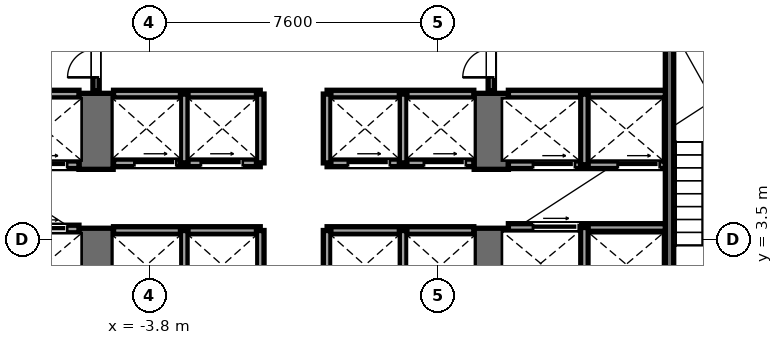
"""IFC4 building model, lengths in metres.
Left out: names, types, materials, properties, quantities, classifications, styles, units other than length and angle.
Written with IfcOpenShell. Run it as: python <this file> out.ifc"""

import sys

from ifc_helpers import new_model, si_unit, direction, frame, frame_2d, origin, place, context, subcontext, project, spatial, rectangle, extrude, element, fill, save


model = new_model("IFC4")
c1 = context("Model", 3, precision=1e-05, world=origin(), true_north=direction((0.0, 1.0)))
c2 = subcontext(c1, "Body", "Model", "MODEL_VIEW")
j1 = project(units=[si_unit("LENGTHUNIT", "METRE"), si_unit("PLANEANGLEUNIT", "RADIAN")], contexts=[c1])
p1 = place(None, origin())
s1 = spatial("IfcSite", under=j1, at=p1, CompositionType="ELEMENT")
p2 = place(p1, origin())
s2 = spatial("IfcBuilding", under=s1, at=p2, CompositionType="ELEMENT")
p3 = place(p2, origin())
s3 = spatial("IfcBuildingStorey", under=s2, at=p3, CompositionType="ELEMENT", Elevation=0.0)
p4 = place(p3, frame((-5.2, 0.95, 0.0), z_axis=(0.0, 0.0, 1.0), x_axis=(0.0, 1.0, 0.0)))
e1 = element("IfcWall", 1, at=p4, inside=s3, PredefinedType="SHEAR", context=c2, shape_type="SweptSolid", body=[
    extrude(rectangle(XDim=2.85, YDim=0.9, at=frame_2d((1.425, 0.0))), origin(), (0.0, 0.0, 1.0), 6.0),
])
p5 = place(p3, frame((-5.2, 5.35, 0.0), z_axis=(0.0, 0.0, 1.0), x_axis=(0.0, 1.0, 0.0)))
e2 = element("IfcWall", 2, at=p5, inside=s3, PredefinedType="SHEAR", context=c2, shape_type="SweptSolid", body=[
    extrude(rectangle(XDim=2.0, YDim=0.9, at=frame_2d((1.0, 0.0))), origin(), (0.0, 0.0, 1.0), 6.0),
])
p6 = place(p3, frame((5.2, 0.95, 0.0), z_axis=(0.0, 0.0, 1.0), x_axis=(0.0, 1.0, 0.0)))
e3 = element("IfcWall", 3, at=p6, inside=s3, PredefinedType="SHEAR", context=c2, shape_type="SweptSolid", body=[
    extrude(rectangle(XDim=2.85, YDim=0.9, at=frame_2d((1.425, 0.0))), origin(), (0.0, 0.0, 1.0), 6.0),
])
p7 = place(p3, frame((5.2, 5.35, 0.0), z_axis=(0.0, 0.0, 1.0), x_axis=(0.0, 1.0, 0.0)))
e4 = element("IfcWall", 4, at=p7, inside=s3, PredefinedType="SHEAR", context=c2, shape_type="SweptSolid", body=[
    extrude(rectangle(XDim=2.0, YDim=0.9, at=frame_2d((1.0, 0.0))), origin(), (0.0, 0.0, 1.0), 6.0),
])
p8 = place(p3, frame((9.89, 1.85, 0.0), z_axis=(0.0, 0.0, 1.0), x_axis=(0.0, 1.0, 0.0)))
e5 = element("IfcWall", 5, at=p8, inside=s3, PredefinedType="SHEAR", context=c2, shape_type="SweptSolid", body=[
    extrude(rectangle(XDim=7.15, YDim=0.22, at=frame_2d((3.575, 0.0))), origin(), (0.0, 0.0, 1.0), 6.0),
])
p9 = place(p3, frame((-9.78, 3.78, 0.0), z_axis=(0.0, 0.0, 1.0), x_axis=(1.0, 0.0, 0.0)))
e6 = element("IfcWall", 6, at=p9, inside=s3, PredefinedType="SOLIDWALL", context=c2, shape_type="SweptSolid", body=[
    extrude(rectangle(XDim=4.13, YDim=0.2, at=frame_2d((2.065, 0.0))), origin(), (0.0, 0.0, 1.0), 5.78),
])
p10 = place(p9, frame((2.72, 0.0, 0.0)))
e7 = element("IfcOpeningElement", 7, at=p10, cuts=e6, PredefinedType="OPENING", context=c2, shape_type="SweptSolid", body=[
    extrude(rectangle(XDim=1.1, YDim=2.2, at=frame_2d((0.55, 1.1))), frame((0.0, 0.11, 0.0), z_axis=(0.0, -1.0, 0.0), x_axis=(1.0, 0.0, 0.0)), (0.0, 0.0, 1.0), 0.22),
])
p11 = place(p3, frame((-9.78, 5.47, 0.0), z_axis=(0.0, 0.0, 1.0), x_axis=(1.0, 0.0, 0.0)))
e8 = element("IfcWall", 8, at=p11, inside=s3, PredefinedType="SOLIDWALL", context=c2, shape_type="SweptSolid", body=[
    extrude(rectangle(XDim=4.13, YDim=0.2, at=frame_2d((2.065, 0.0))), origin(), (0.0, 0.0, 1.0), 5.78),
])
p12 = place(p11, frame((0.55, 0.0, 0.0)))
e9 = element("IfcOpeningElement", 9, at=p12, cuts=e8, PredefinedType="OPENING", context=c2, shape_type="SweptSolid", body=[
    extrude(rectangle(XDim=1.1, YDim=2.2, at=frame_2d((0.55, 1.1))), frame((0.0, 0.11, 0.0), z_axis=(0.0, -1.0, 0.0), x_axis=(1.0, 0.0, 0.0)), (0.0, 0.0, 1.0), 0.22),
])
p13 = place(p11, frame((2.72, 0.0, 0.0)))
e10 = element("IfcOpeningElement", 10, at=p13, cuts=e8, PredefinedType="OPENING", context=c2, shape_type="SweptSolid", body=[
    extrude(rectangle(XDim=1.1, YDim=2.2, at=frame_2d((0.55, 1.1))), frame((0.0, 0.11, 0.0), z_axis=(0.0, -1.0, 0.0), x_axis=(1.0, 0.0, 0.0)), (0.0, 0.0, 1.0), 0.22),
])
p14 = place(p3, frame((-9.78, 7.33, 0.0), z_axis=(0.0, 0.0, 1.0), x_axis=(1.0, 0.0, 0.0)))
e11 = element("IfcWall", 11, at=p14, inside=s3, PredefinedType="SOLIDWALL", context=c2, shape_type="SweptSolid", body=[
    extrude(rectangle(XDim=4.13, YDim=0.2, at=frame_2d((2.065, 0.0))), origin(), (0.0, 0.0, 1.0), 5.78),
])
p15 = place(p3, frame((5.65, 3.82, 0.0), z_axis=(0.0, 0.0, 1.0), x_axis=(1.0, 0.0, 0.0)))
e12 = element("IfcWall", 12, at=p15, inside=s3, PredefinedType="SOLIDWALL", context=c2, shape_type="SweptSolid", body=[
    extrude(rectangle(XDim=4.13, YDim=0.2, at=frame_2d((2.065, 0.0))), origin(), (0.0, 0.0, 1.0), 5.78),
])
p16 = place(p15, frame((0.65, 0.0, 0.0)))
e13 = element("IfcOpeningElement", 13, at=p16, cuts=e12, PredefinedType="OPENING", context=c2, shape_type="SweptSolid", body=[
    extrude(rectangle(XDim=1.2, YDim=2.2, at=frame_2d((0.6, 1.1))), frame((0.0, 0.11, 0.0), z_axis=(0.0, -1.0, 0.0), x_axis=(1.0, 0.0, 0.0)), (0.0, 0.0, 1.0), 0.22),
])
p17 = place(p3, frame((7.65, 1.85, 0.0), z_axis=(0.0, 0.0, 1.0), x_axis=(0.0, 1.0, 0.0)))
e14 = element("IfcWall", 14, at=p17, inside=s3, PredefinedType="SOLIDWALL", context=c2, shape_type="SweptSolid", body=[
    extrude(rectangle(XDim=1.97, YDim=0.2, at=frame_2d((0.985, 0.0))), origin(), (0.0, 0.0, 1.0), 5.78),
])
p18 = place(p3, frame((5.65, 5.47, 0.0), z_axis=(0.0, 0.0, 1.0), x_axis=(1.0, 0.0, 0.0)))
e15 = element("IfcWall", 15, at=p18, inside=s3, PredefinedType="SOLIDWALL", context=c2, shape_type="SweptSolid", body=[
    extrude(rectangle(XDim=4.13, YDim=0.2, at=frame_2d((2.065, 0.0))), origin(), (0.0, 0.0, 1.0), 5.78),
])
p19 = place(p18, frame((0.65, 0.0, 0.0)))
e16 = element("IfcOpeningElement", 16, at=p19, cuts=e15, PredefinedType="OPENING", context=c2, shape_type="SweptSolid", body=[
    extrude(rectangle(XDim=1.1, YDim=2.2, at=frame_2d((0.55, 1.1))), frame((0.0, 0.11, 0.0), z_axis=(0.0, -1.0, 0.0), x_axis=(1.0, 0.0, 0.0)), (0.0, 0.0, 1.0), 0.22),
])
p20 = place(p18, frame((2.88, 0.0, 0.0)))
e17 = element("IfcOpeningElement", 17, at=p20, cuts=e15, PredefinedType="OPENING", context=c2, shape_type="SweptSolid", body=[
    extrude(rectangle(XDim=1.1, YDim=2.2, at=frame_2d((0.55, 1.1))), frame((0.0, 0.11, 0.0), z_axis=(0.0, -1.0, 0.0), x_axis=(1.0, 0.0, 0.0)), (0.0, 0.0, 1.0), 0.22),
])
p21 = place(p3, frame((5.65, 7.33, 0.0), z_axis=(0.0, 0.0, 1.0), x_axis=(1.0, 0.0, 0.0)))
e18 = element("IfcWall", 18, at=p21, inside=s3, PredefinedType="SOLIDWALL", context=c2, shape_type="SweptSolid", body=[
    extrude(rectangle(XDim=4.13, YDim=0.2, at=frame_2d((2.065, 0.0))), origin(), (0.0, 0.0, 1.0), 5.78),
])
p22 = place(p3, frame((7.65, 5.47, 0.0), z_axis=(0.0, 0.0, 1.0), x_axis=(0.0, 1.0, 0.0)))
e19 = element("IfcWall", 19, at=p22, inside=s3, PredefinedType="SOLIDWALL", context=c2, shape_type="SweptSolid", body=[
    extrude(rectangle(XDim=1.86, YDim=0.2, at=frame_2d((0.93, 0.0))), origin(), (0.0, 0.0, 1.0), 5.78),
])
for number, where, z_axis, x_axis in (
    (20, (-4.74, 3.74, 0.0), (0.0, 0.0, 1.0), (1.0, 0.0, 0.0)),
    (21, (0.88, 3.74, 0.0), (0.0, 0.0, 1.0), (1.0, 0.0, 0.0)),
):
    element("IfcWall", number, at=place(p3, frame(where, z_axis=z_axis, x_axis=x_axis)), inside=s3, PredefinedType="SOLIDWALL", context=c2, shape_type="SweptSolid", body=[
        extrude(rectangle(XDim=3.86, YDim=0.2, at=frame_2d((1.93, 0.0))), origin(), (0.0, 0.0, 1.0), 5.78),
    ])
for number, where, z_axis, x_axis in (
    (22, (-2.88, 1.92, 0.0), (0.0, 0.0, 1.0), (0.0, 1.0, 0.0)),
    (23, (2.88, 1.92, 0.0), (0.0, 0.0, 1.0), (0.0, 1.0, 0.0)),
    (24, (-0.88, 1.92, 0.0), (0.0, 0.0, 1.0), (0.0, 1.0, 0.0)),
    (25, (0.88, 1.92, 0.0), (0.0, 0.0, 1.0), (0.0, 1.0, 0.0)),
):
    element("IfcWall", number, at=place(p3, frame(where, z_axis=z_axis, x_axis=x_axis)), inside=s3, PredefinedType="SOLIDWALL", context=c2, shape_type="SweptSolid", body=[
        extrude(rectangle(XDim=1.82, YDim=0.2, at=frame_2d((0.91, 0.0))), origin(), (0.0, 0.0, 1.0), 5.78),
    ])
p23 = place(p3, frame((-4.74, 5.52, 0.0), z_axis=(0.0, 0.0, 1.0), x_axis=(1.0, 0.0, 0.0)))
e26 = element("IfcWall", 26, at=p23, inside=s3, PredefinedType="SOLIDWALL", context=c2, shape_type="SweptSolid", body=[
    extrude(rectangle(XDim=3.86, YDim=0.2, at=frame_2d((1.93, 0.0))), origin(), (0.0, 0.0, 1.0), 5.78),
])
p24 = place(p23, frame((0.55, 0.0, 0.0)))
e27 = element("IfcOpeningElement", 27, at=p24, cuts=e26, PredefinedType="OPENING", context=c2, shape_type="SweptSolid", body=[
    extrude(rectangle(XDim=1.1, YDim=2.2, at=frame_2d((0.55, 1.1))), frame((0.0, 0.11, 0.0), z_axis=(0.0, -1.0, 0.0), x_axis=(1.0, 0.0, 0.0)), (0.0, 0.0, 1.0), 0.22),
])
p25 = place(p23, frame((2.3, 0.0, 0.0)))
e28 = element("IfcOpeningElement", 28, at=p25, cuts=e26, PredefinedType="OPENING", context=c2, shape_type="SweptSolid", body=[
    extrude(rectangle(XDim=1.1, YDim=2.2, at=frame_2d((0.55, 1.1))), frame((0.0, 0.11, 0.0), z_axis=(0.0, -1.0, 0.0), x_axis=(1.0, 0.0, 0.0)), (0.0, 0.0, 1.0), 0.22),
])
p26 = place(p3, frame((0.88, 5.52, 0.0), z_axis=(0.0, 0.0, 1.0), x_axis=(1.0, 0.0, 0.0)))
e29 = element("IfcWall", 29, at=p26, inside=s3, PredefinedType="SOLIDWALL", context=c2, shape_type="SweptSolid", body=[
    extrude(rectangle(XDim=3.86, YDim=0.2, at=frame_2d((1.93, 0.0))), origin(), (0.0, 0.0, 1.0), 5.78),
])
p27 = place(p26, frame((0.55, 0.0, 0.0)))
e30 = element("IfcOpeningElement", 30, at=p27, cuts=e29, PredefinedType="OPENING", context=c2, shape_type="SweptSolid", body=[
    extrude(rectangle(XDim=1.1, YDim=2.2, at=frame_2d((0.55, 1.1))), frame((0.0, 0.11, 0.0), z_axis=(0.0, -1.0, 0.0), x_axis=(1.0, 0.0, 0.0)), (0.0, 0.0, 1.0), 0.22),
])
p28 = place(p26, frame((2.55, 0.0, 0.0)))
e31 = element("IfcOpeningElement", 31, at=p28, cuts=e29, PredefinedType="OPENING", context=c2, shape_type="SweptSolid", body=[
    extrude(rectangle(XDim=1.1, YDim=2.2, at=frame_2d((0.55, 1.1))), frame((0.0, 0.11, 0.0), z_axis=(0.0, -1.0, 0.0), x_axis=(1.0, 0.0, 0.0)), (0.0, 0.0, 1.0), 0.22),
])
for number, where, z_axis, x_axis in (
    (32, (-4.74, 7.33, 0.0), (0.0, 0.0, 1.0), (1.0, 0.0, 0.0)),
    (33, (0.88, 7.33, 0.0), (0.0, 0.0, 1.0), (1.0, 0.0, 0.0)),
):
    element("IfcWall", number, at=place(p3, frame(where, z_axis=z_axis, x_axis=x_axis)), inside=s3, PredefinedType="SOLIDWALL", context=c2, shape_type="SweptSolid", body=[
        extrude(rectangle(XDim=3.86, YDim=0.2, at=frame_2d((1.93, 0.0))), origin(), (0.0, 0.0, 1.0), 5.78),
    ])
for number, where, z_axis, x_axis in (
    (34, (-2.88, 5.52, 0.0), (0.0, 0.0, 1.0), (0.0, 1.0, 0.0)),
    (35, (2.88, 5.52, 0.0), (0.0, 0.0, 1.0), (0.0, 1.0, 0.0)),
    (36, (-0.88, 5.52, 0.0), (0.0, 0.0, 1.0), (0.0, 1.0, 0.0)),
    (37, (0.88, 5.52, 0.0), (0.0, 0.0, 1.0), (0.0, 1.0, 0.0)),
):
    element("IfcWall", number, at=place(p3, frame(where, z_axis=z_axis, x_axis=x_axis)), inside=s3, PredefinedType="SOLIDWALL", context=c2, shape_type="SweptSolid", body=[
        extrude(rectangle(XDim=1.81, YDim=0.2, at=frame_2d((0.905, 0.0))), origin(), (0.0, 0.0, 1.0), 5.78),
    ])
p29 = place(p3, frame((-5.2, 7.42, 0.0), z_axis=(0.0, 0.0, 1.0), x_axis=(0.0, 1.0, 0.0)))
e38 = element("IfcWall", 38, at=p29, inside=s3, PredefinedType="PARTITIONING", context=c2, shape_type="SweptSolid", body=[
    extrude(rectangle(XDim=1.58, YDim=0.165, at=frame_2d((0.79, 0.0))), origin(), (0.0, 0.0, 1.0), 5.78),
])
p30 = place(p29, frame((0.35, 0.0, 0.0)))
e39 = element("IfcOpeningElement", 39, at=p30, cuts=e38, PredefinedType="OPENING", context=c2, shape_type="SweptSolid", body=[
    extrude(rectangle(XDim=0.75, YDim=2.1, at=frame_2d((0.375, 1.05))), frame((0.0, 0.093, 0.0), z_axis=(0.0, -1.0, 0.0), x_axis=(1.0, 0.0, 0.0)), (0.0, 0.0, 1.0), 0.185),
])
p31 = place(p3, frame((5.2, 7.42, 0.0), z_axis=(0.0, 0.0, 1.0), x_axis=(0.0, 1.0, 0.0)))
e40 = element("IfcWall", 40, at=p31, inside=s3, PredefinedType="PARTITIONING", context=c2, shape_type="SweptSolid", body=[
    extrude(rectangle(XDim=1.58, YDim=0.165, at=frame_2d((0.79, 0.0))), origin(), (0.0, 0.0, 1.0), 5.78),
])
p32 = place(p31, frame((0.35, 0.0, 0.0)))
e41 = element("IfcOpeningElement", 41, at=p32, cuts=e40, PredefinedType="OPENING", context=c2, shape_type="SweptSolid", body=[
    extrude(rectangle(XDim=0.75, YDim=2.1, at=frame_2d((0.375, 1.05))), frame((0.0, 0.093, 0.0), z_axis=(0.0, -1.0, 0.0), x_axis=(1.0, 0.0, 0.0)), (0.0, 0.0, 1.0), 0.185),
])
p33 = place(p13, origin())
e42 = element("IfcDoor", 42, at=p33, inside=s3, OperationType="SLIDING_TO_LEFT", PredefinedType="DOOR", context=c2, shape_type="SweptSolid", body=[
    extrude(rectangle(XDim=1.1, YDim=2.2, at=frame_2d((0.55, 1.1))), frame((0.0, 0.025, 0.0), z_axis=(0.0, -1.0, 0.0), x_axis=(1.0, 0.0, 0.0)), (0.0, 0.0, 1.0), 0.05),
])
fill(e10, e42)
p34 = place(p10, origin())
e43 = element("IfcDoor", 43, at=p34, inside=s3, OperationType="SLIDING_TO_LEFT", PredefinedType="DOOR", context=c2, shape_type="SweptSolid", body=[
    extrude(rectangle(XDim=1.1, YDim=2.2, at=frame_2d((0.55, 1.1))), frame((0.0, 0.025, 0.0), z_axis=(0.0, -1.0, 0.0), x_axis=(1.0, 0.0, 0.0)), (0.0, 0.0, 1.0), 0.05),
])
fill(e7, e43)
p35 = place(p16, origin())
e44 = element("IfcDoor", 44, at=p35, inside=s3, OperationType="SLIDING_TO_RIGHT", PredefinedType="DOOR", context=c2, shape_type="SweptSolid", body=[
    extrude(rectangle(XDim=1.2, YDim=2.2, at=frame_2d((0.6, 1.1))), frame((0.0, 0.025, 0.0), z_axis=(0.0, -1.0, 0.0), x_axis=(1.0, 0.0, 0.0)), (0.0, 0.0, 1.0), 0.05),
])
fill(e13, e44)
p36 = place(p19, origin())
e45 = element("IfcDoor", 45, at=p36, inside=s3, OperationType="SLIDING_TO_LEFT", PredefinedType="DOOR", context=c2, shape_type="SweptSolid", body=[
    extrude(rectangle(XDim=1.1, YDim=2.2, at=frame_2d((0.55, 1.1))), frame((0.0, 0.025, 0.0), z_axis=(0.0, -1.0, 0.0), x_axis=(1.0, 0.0, 0.0)), (0.0, 0.0, 1.0), 0.05),
])
fill(e16, e45)
p37 = place(p20, origin())
e46 = element("IfcDoor", 46, at=p37, inside=s3, OperationType="SLIDING_TO_LEFT", PredefinedType="DOOR", context=c2, shape_type="SweptSolid", body=[
    extrude(rectangle(XDim=1.1, YDim=2.2, at=frame_2d((0.55, 1.1))), frame((0.0, 0.025, 0.0), z_axis=(0.0, -1.0, 0.0), x_axis=(1.0, 0.0, 0.0)), (0.0, 0.0, 1.0), 0.05),
])
fill(e17, e46)
p38 = place(p24, origin())
e47 = element("IfcDoor", 47, at=p38, inside=s3, OperationType="SLIDING_TO_LEFT", PredefinedType="DOOR", context=c2, shape_type="SweptSolid", body=[
    extrude(rectangle(XDim=1.1, YDim=2.2, at=frame_2d((0.55, 1.1))), frame((0.0, 0.025, 0.0), z_axis=(0.0, -1.0, 0.0), x_axis=(1.0, 0.0, 0.0)), (0.0, 0.0, 1.0), 0.05),
])
fill(e27, e47)
p39 = place(p25, origin())
e48 = element("IfcDoor", 48, at=p39, inside=s3, OperationType="SLIDING_TO_LEFT", PredefinedType="DOOR", context=c2, shape_type="SweptSolid", body=[
    extrude(rectangle(XDim=1.1, YDim=2.2, at=frame_2d((0.55, 1.1))), frame((0.0, 0.025, 0.0), z_axis=(0.0, -1.0, 0.0), x_axis=(1.0, 0.0, 0.0)), (0.0, 0.0, 1.0), 0.05),
])
fill(e28, e48)
p40 = place(p27, origin())
e49 = element("IfcDoor", 49, at=p40, inside=s3, OperationType="SLIDING_TO_LEFT", PredefinedType="DOOR", context=c2, shape_type="SweptSolid", body=[
    extrude(rectangle(XDim=1.1, YDim=2.2, at=frame_2d((0.55, 1.1))), frame((0.0, 0.025, 0.0), z_axis=(0.0, -1.0, 0.0), x_axis=(1.0, 0.0, 0.0)), (0.0, 0.0, 1.0), 0.05),
])
fill(e30, e49)
p41 = place(p28, origin())
e50 = element("IfcDoor", 50, at=p41, inside=s3, OperationType="SLIDING_TO_LEFT", PredefinedType="DOOR", context=c2, shape_type="SweptSolid", body=[
    extrude(rectangle(XDim=1.1, YDim=2.2, at=frame_2d((0.55, 1.1))), frame((0.0, 0.025, 0.0), z_axis=(0.0, -1.0, 0.0), x_axis=(1.0, 0.0, 0.0)), (0.0, 0.0, 1.0), 0.05),
])
fill(e31, e50)
p42 = place(p30, origin())
e51 = element("IfcDoor", 51, at=p42, inside=s3, OperationType="SINGLE_SWING_LEFT", PredefinedType="DOOR", context=c2, shape_type="SweptSolid", body=[
    extrude(rectangle(XDim=0.75, YDim=2.1, at=frame_2d((0.375, 1.05))), frame((0.0, 0.025, 0.0), z_axis=(0.0, -1.0, 0.0), x_axis=(1.0, 0.0, 0.0)), (0.0, 0.0, 1.0), 0.05),
])
fill(e39, e51)
p43 = place(p32, origin())
e52 = element("IfcDoor", 52, at=p43, inside=s3, OperationType="SINGLE_SWING_LEFT", PredefinedType="DOOR", context=c2, shape_type="SweptSolid", body=[
    extrude(rectangle(XDim=0.75, YDim=2.1, at=frame_2d((0.375, 1.05))), frame((0.0, 0.025, 0.0), z_axis=(0.0, -1.0, 0.0), x_axis=(1.0, 0.0, 0.0)), (0.0, 0.0, 1.0), 0.05),
])
fill(e41, e52)
save(model, sys.argv[1])
